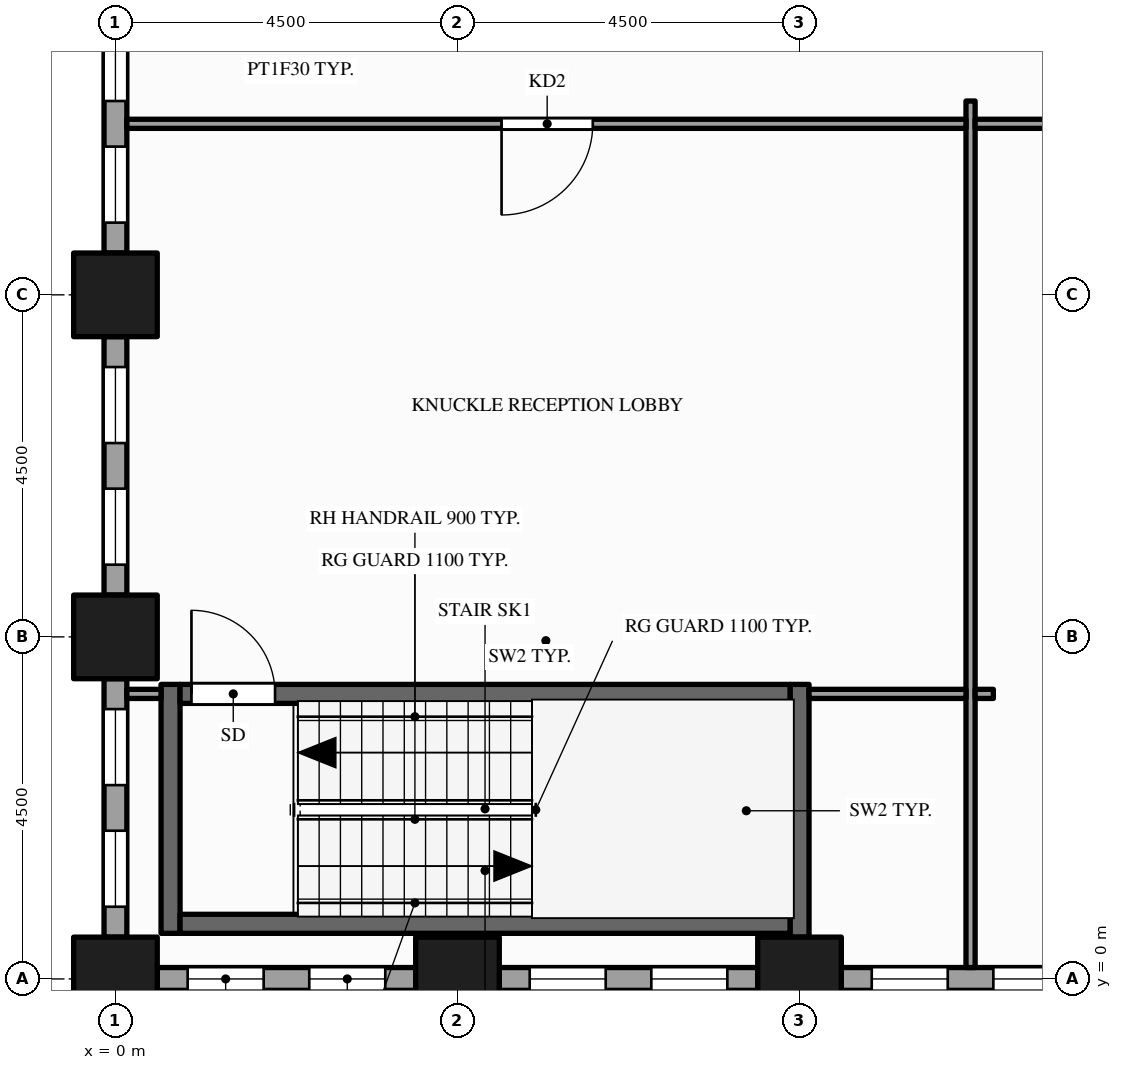
"""IFC4 building model, lengths in metres.
Left out: names, types, materials, properties, quantities, classifications, styles, units other than length and angle.
Written with IfcOpenShell. Run it as: python <this file> out.ifc"""

import sys

from ifc_helpers import new_model, si_unit, direction, frame, frame_2d, origin, origin_2d, place, context, subcontext, project, spatial, rectangle, hollow_rectangle, extrude, element, fill, save


model = new_model("IFC4")
c1 = context("Model", 3, precision=1e-05, world=origin(), true_north=direction((0.0, 1.0)))
c2 = subcontext(c1, "Body", "Model", "MODEL_VIEW")
j1 = project(units=[si_unit("LENGTHUNIT", "METRE"), si_unit("PLANEANGLEUNIT", "RADIAN")], contexts=[c1])
p1 = place(None, origin())
s1 = spatial("IfcSite", under=j1, at=p1, CompositionType="ELEMENT")
p2 = place(p1, origin())
s2 = spatial("IfcBuilding", under=s1, at=p2, CompositionType="ELEMENT")
p3 = place(p2, frame((0.0, 0.0, 45.0)))
s3 = spatial("IfcBuildingStorey", under=s2, at=p3, CompositionType="ELEMENT", Elevation=45.0)
for number, where, z_axis, x_axis in (
    (1, (0.0, 0.0, -0.15), (0.0, 0.0, 1.0), (1.0, 0.0, 0.0)),
    (2, (0.0, 4.5, -0.15), (0.0, 0.0, 1.0), (1.0, 0.0, 0.0)),
    (3, (0.0, 9.0, -0.15), (0.0, 0.0, 1.0), (1.0, 0.0, 0.0)),
    (4, (4.5, 0.0, -0.15), (0.0, 0.0, 1.0), (1.0, 0.0, 0.0)),
    (5, (9.0, 0.0, -0.15), (0.0, 0.0, 1.0), (1.0, 0.0, 0.0)),
):
    element("IfcColumn", number, at=place(p3, frame(where, z_axis=z_axis, x_axis=x_axis)), inside=s3, PredefinedType="COLUMN", context=c2, shape_type="SweptSolid", body=[
        extrude(hollow_rectangle(XDim=1.1, YDim=1.1, WallThickness=0.06, at=origin_2d()), origin(), (0.0, 0.0, 1.0), 4.0),
    ])
p4 = place(p3, frame((0.55, 0.0, 0.0), z_axis=(0.0, 0.0, 1.0), x_axis=(1.0, 0.0, 0.0)))
e6 = element("IfcWall", 6, at=p4, inside=s3, PredefinedType="STANDARD", context=c2, shape_type="SweptSolid", body=[
    extrude(rectangle(XDim=3.4, YDim=0.3, at=frame_2d((1.7, 0.0))), origin(), (0.0, 0.0, 1.0), 3.144),
])
p5 = place(p4, frame((0.4, 0.0, 0.9)))
e7 = element("IfcOpeningElement", 7, at=p5, cuts=e6, PredefinedType="OPENING", context=c2, shape_type="SweptSolid", body=[
    extrude(rectangle(XDim=1.0, YDim=2.0, at=frame_2d((0.5, 1.0))), frame((0.0, 0.16, 0.0), z_axis=(0.0, -1.0, 0.0), x_axis=(1.0, 0.0, 0.0)), (0.0, 0.0, 1.0), 0.32),
])
p6 = place(p4, frame((2.0, 0.0, 0.9)))
e8 = element("IfcOpeningElement", 8, at=p6, cuts=e6, PredefinedType="OPENING", context=c2, shape_type="SweptSolid", body=[
    extrude(rectangle(XDim=1.0, YDim=2.0, at=frame_2d((0.5, 1.0))), frame((0.0, 0.16, 0.0), z_axis=(0.0, -1.0, 0.0), x_axis=(1.0, 0.0, 0.0)), (0.0, 0.0, 1.0), 0.32),
])
p7 = place(p3, frame((5.05, 0.0, 0.0), z_axis=(0.0, 0.0, 1.0), x_axis=(1.0, 0.0, 0.0)))
e9 = element("IfcWall", 9, at=p7, inside=s3, PredefinedType="STANDARD", context=c2, shape_type="SweptSolid", body=[
    extrude(rectangle(XDim=3.4, YDim=0.3, at=frame_2d((1.7, 0.0))), origin(), (0.0, 0.0, 1.0), 3.144),
])
p8 = place(p7, frame((0.4, 0.0, 0.9)))
e10 = element("IfcOpeningElement", 10, at=p8, cuts=e9, PredefinedType="OPENING", context=c2, shape_type="SweptSolid", body=[
    extrude(rectangle(XDim=1.0, YDim=2.0, at=frame_2d((0.5, 1.0))), frame((0.0, 0.16, 0.0), z_axis=(0.0, -1.0, 0.0), x_axis=(1.0, 0.0, 0.0)), (0.0, 0.0, 1.0), 0.32),
])
p9 = place(p7, frame((2.0, 0.0, 0.9)))
e11 = element("IfcOpeningElement", 11, at=p9, cuts=e9, PredefinedType="OPENING", context=c2, shape_type="SweptSolid", body=[
    extrude(rectangle(XDim=1.0, YDim=2.0, at=frame_2d((0.5, 1.0))), frame((0.0, 0.16, 0.0), z_axis=(0.0, -1.0, 0.0), x_axis=(1.0, 0.0, 0.0)), (0.0, 0.0, 1.0), 0.32),
])
p10 = place(p3, frame((9.55, 0.0, 0.0), z_axis=(0.0, 0.0, 1.0), x_axis=(1.0, 0.0, 0.0)))
e12 = element("IfcWall", 12, at=p10, inside=s3, PredefinedType="STANDARD", context=c2, shape_type="SweptSolid", body=[
    extrude(rectangle(XDim=3.4, YDim=0.3, at=frame_2d((1.7, 0.0))), origin(), (0.0, 0.0, 1.0), 3.144),
])
p11 = place(p10, frame((0.4, 0.0, 0.9)))
e13 = element("IfcOpeningElement", 13, at=p11, cuts=e12, PredefinedType="OPENING", context=c2, shape_type="SweptSolid", body=[
    extrude(rectangle(XDim=1.0, YDim=2.0, at=frame_2d((0.5, 1.0))), frame((0.0, 0.16, 0.0), z_axis=(0.0, -1.0, 0.0), x_axis=(1.0, 0.0, 0.0)), (0.0, 0.0, 1.0), 0.32),
])
p12 = place(p10, frame((2.0, 0.0, 0.9)))
e14 = element("IfcOpeningElement", 14, at=p12, cuts=e12, PredefinedType="OPENING", context=c2, shape_type="SweptSolid", body=[
    extrude(rectangle(XDim=1.0, YDim=2.0, at=frame_2d((0.5, 1.0))), frame((0.0, 0.16, 0.0), z_axis=(0.0, -1.0, 0.0), x_axis=(1.0, 0.0, 0.0)), (0.0, 0.0, 1.0), 0.32),
])
p13 = place(p3, frame((0.0, 12.95, 0.0), z_axis=(0.0, 0.0, 1.0), x_axis=(0.0, -1.0, 0.0)))
e15 = element("IfcWall", 15, at=p13, inside=s3, PredefinedType="STANDARD", context=c2, shape_type="SweptSolid", body=[
    extrude(rectangle(XDim=3.4, YDim=0.3, at=frame_2d((1.7, 0.0))), origin(), (0.0, 0.0, 1.0), 3.144),
])
p14 = place(p13, frame((0.4, 0.0, 0.9)))
e16 = element("IfcOpeningElement", 16, at=p14, cuts=e15, PredefinedType="OPENING", context=c2, shape_type="SweptSolid", body=[
    extrude(rectangle(XDim=1.0, YDim=2.0, at=frame_2d((0.5, 1.0))), frame((0.0, 0.16, 0.0), z_axis=(0.0, -1.0, 0.0), x_axis=(1.0, 0.0, 0.0)), (0.0, 0.0, 1.0), 0.32),
])
p15 = place(p13, frame((2.0, 0.0, 0.9)))
e17 = element("IfcOpeningElement", 17, at=p15, cuts=e15, PredefinedType="OPENING", context=c2, shape_type="SweptSolid", body=[
    extrude(rectangle(XDim=1.0, YDim=2.0, at=frame_2d((0.5, 1.0))), frame((0.0, 0.16, 0.0), z_axis=(0.0, -1.0, 0.0), x_axis=(1.0, 0.0, 0.0)), (0.0, 0.0, 1.0), 0.32),
])
p16 = place(p3, frame((0.0, 8.45, 0.0), z_axis=(0.0, 0.0, 1.0), x_axis=(0.0, -1.0, 0.0)))
e18 = element("IfcWall", 18, at=p16, inside=s3, PredefinedType="STANDARD", context=c2, shape_type="SweptSolid", body=[
    extrude(rectangle(XDim=3.4, YDim=0.3, at=frame_2d((1.7, 0.0))), origin(), (0.0, 0.0, 1.0), 3.144),
])
p17 = place(p16, frame((0.4, 0.0, 0.9)))
e19 = element("IfcOpeningElement", 19, at=p17, cuts=e18, PredefinedType="OPENING", context=c2, shape_type="SweptSolid", body=[
    extrude(rectangle(XDim=1.0, YDim=2.0, at=frame_2d((0.5, 1.0))), frame((0.0, 0.16, 0.0), z_axis=(0.0, -1.0, 0.0), x_axis=(1.0, 0.0, 0.0)), (0.0, 0.0, 1.0), 0.32),
])
p18 = place(p16, frame((2.0, 0.0, 0.9)))
e20 = element("IfcOpeningElement", 20, at=p18, cuts=e18, PredefinedType="OPENING", context=c2, shape_type="SweptSolid", body=[
    extrude(rectangle(XDim=1.0, YDim=2.0, at=frame_2d((0.5, 1.0))), frame((0.0, 0.16, 0.0), z_axis=(0.0, -1.0, 0.0), x_axis=(1.0, 0.0, 0.0)), (0.0, 0.0, 1.0), 0.32),
])
p19 = place(p3, frame((0.0, 3.95, 0.0), z_axis=(0.0, 0.0, 1.0), x_axis=(0.0, -1.0, 0.0)))
e21 = element("IfcWall", 21, at=p19, inside=s3, PredefinedType="STANDARD", context=c2, shape_type="SweptSolid", body=[
    extrude(rectangle(XDim=3.4, YDim=0.3, at=frame_2d((1.7, 0.0))), origin(), (0.0, 0.0, 1.0), 3.144),
])
p20 = place(p19, frame((0.4, 0.0, 0.9)))
e22 = element("IfcOpeningElement", 22, at=p20, cuts=e21, PredefinedType="OPENING", context=c2, shape_type="SweptSolid", body=[
    extrude(rectangle(XDim=1.0, YDim=2.0, at=frame_2d((0.5, 1.0))), frame((0.0, 0.16, 0.0), z_axis=(0.0, -1.0, 0.0), x_axis=(1.0, 0.0, 0.0)), (0.0, 0.0, 1.0), 0.32),
])
p21 = place(p19, frame((2.0, 0.0, 0.9)))
e23 = element("IfcOpeningElement", 23, at=p21, cuts=e21, PredefinedType="OPENING", context=c2, shape_type="SweptSolid", body=[
    extrude(rectangle(XDim=1.0, YDim=2.0, at=frame_2d((0.5, 1.0))), frame((0.0, 0.16, 0.0), z_axis=(0.0, -1.0, 0.0), x_axis=(1.0, 0.0, 0.0)), (0.0, 0.0, 1.0), 0.32),
])
p22 = place(p3, frame((0.725, 0.6, 0.0), z_axis=(0.0, 0.0, 1.0), x_axis=(0.0, 1.0, 0.0)))
e24 = element("IfcWall", 24, at=p22, inside=s3, PredefinedType="SHEAR", context=c2, shape_type="SweptSolid", body=[
    extrude(rectangle(XDim=3.275, YDim=0.25, at=frame_2d((1.637, 0.0))), origin(), (0.0, 0.0, 1.0), 3.85),
])
p23 = place(p3, frame((9.0, 0.55, 0.0), z_axis=(0.0, 0.0, 1.0), x_axis=(0.0, 1.0, 0.0)))
e25 = element("IfcWall", 25, at=p23, inside=s3, PredefinedType="SHEAR", context=c2, shape_type="SweptSolid", body=[
    extrude(rectangle(XDim=3.325, YDim=0.25, at=frame_2d((1.663, 0.0))), origin(), (0.0, 0.0, 1.0), 3.85),
])
p24 = place(p3, frame((11.25, 0.15, 0.0), z_axis=(0.0, 0.0, 1.0), x_axis=(0.0, 1.0, 0.0)))
e26 = element("IfcWall", 26, at=p24, inside=s3, PredefinedType="PARTITIONING", context=c2, shape_type="SweptSolid", body=[
    extrude(rectangle(XDim=11.4, YDim=0.12, at=frame_2d((5.7, 0.0))), origin(), (0.0, 0.0, 1.0), 2.938),
])
p25 = place(p3, frame((0.85, 0.725, 0.0), z_axis=(0.0, 0.0, 1.0), x_axis=(1.0, 0.0, 0.0)))
e27 = element("IfcWall", 27, at=p25, inside=s3, PredefinedType="SHEAR", context=c2, shape_type="SweptSolid", body=[
    extrude(rectangle(XDim=8.025, YDim=0.25, at=frame_2d((4.012, 0.0))), origin(), (0.0, 0.0, 1.0), 3.85),
])
p26 = place(p3, frame((0.15, 3.75, 0.0), z_axis=(0.0, 0.0, 1.0), x_axis=(1.0, 0.0, 0.0)))
e28 = element("IfcWall", 28, at=p26, inside=s3, PredefinedType="PARTITIONING", context=c2, shape_type="SweptSolid", body=[
    extrude(rectangle(XDim=0.45, YDim=0.12, at=frame_2d((0.225, 0.0))), origin(), (0.0, 0.0, 1.0), 3.144),
])
p27 = place(p3, frame((0.85, 3.75, 0.0), z_axis=(0.0, 0.0, 1.0), x_axis=(1.0, 0.0, 0.0)))
e29 = element("IfcWall", 29, at=p27, inside=s3, PredefinedType="SHEAR", context=c2, shape_type="SweptSolid", body=[
    extrude(rectangle(XDim=8.025, YDim=0.25, at=frame_2d((4.012, 0.0))), origin(), (0.0, 0.0, 1.0), 3.85),
])
p28 = place(p27, frame((0.15, 0.0, 0.0)))
e30 = element("IfcOpeningElement", 30, at=p28, cuts=e29, PredefinedType="OPENING", context=c2, shape_type="SweptSolid", body=[
    extrude(rectangle(XDim=1.1, YDim=2.1, at=frame_2d((0.55, 1.05))), frame((0.0, 0.135, 0.0), z_axis=(0.0, -1.0, 0.0), x_axis=(1.0, 0.0, 0.0)), (0.0, 0.0, 1.0), 0.27),
])
p29 = place(p3, frame((9.125, 3.75, 0.0), z_axis=(0.0, 0.0, 1.0), x_axis=(1.0, 0.0, 0.0)))
e31 = element("IfcWall", 31, at=p29, inside=s3, PredefinedType="PARTITIONING", context=c2, shape_type="SweptSolid", body=[
    extrude(rectangle(XDim=2.065, YDim=0.12, at=frame_2d((1.032, 0.0))), origin(), (0.0, 0.0, 1.0), 2.938),
])
p30 = place(p3, frame((11.31, 3.75, 0.0), z_axis=(0.0, 0.0, 1.0), x_axis=(1.0, 0.0, 0.0)))
e32 = element("IfcWall", 32, at=p30, inside=s3, PredefinedType="PARTITIONING", context=c2, shape_type="SweptSolid", body=[
    extrude(rectangle(XDim=0.24, YDim=0.12, at=frame_2d((0.12, 0.0))), origin(), (0.0, 0.0, 1.0), 2.938),
])
p31 = place(p3, frame((0.15, 11.25, 0.0), z_axis=(0.0, 0.0, 1.0), x_axis=(1.0, 0.0, 0.0)))
e33 = element("IfcWall", 33, at=p31, inside=s3, PredefinedType="PARTITIONING", context=c2, shape_type="SweptSolid", body=[
    extrude(rectangle(XDim=11.04, YDim=0.12, at=frame_2d((5.52, 0.0))), origin(), (0.0, 0.0, 1.0), 2.938),
])
p32 = place(p31, frame((4.93, 0.0, 0.0)))
e34 = element("IfcOpeningElement", 34, at=p32, cuts=e33, PredefinedType="OPENING", context=c2, shape_type="SweptSolid", body=[
    extrude(rectangle(XDim=1.2, YDim=2.1, at=frame_2d((0.6, 1.05))), frame((0.0, 0.07, 0.0), z_axis=(0.0, -1.0, 0.0), x_axis=(1.0, 0.0, 0.0)), (0.0, 0.0, 1.0), 0.14),
])
p33 = place(p3, frame((11.31, 11.25, 0.0), z_axis=(0.0, 0.0, 1.0), x_axis=(1.0, 0.0, 0.0)))
e35 = element("IfcWall", 35, at=p33, inside=s3, PredefinedType="PARTITIONING", context=c2, shape_type="SweptSolid", body=[
    extrude(rectangle(XDim=4.38, YDim=0.12, at=frame_2d((2.19, 0.0))), origin(), (0.0, 0.0, 1.0), 2.938),
])
p34 = place(p33, frame((1.69, 0.0, 0.0)))
e36 = element("IfcOpeningElement", 36, at=p34, cuts=e35, PredefinedType="OPENING", context=c2, shape_type="SweptSolid", body=[
    extrude(rectangle(XDim=1.0, YDim=2.1, at=frame_2d((0.5, 1.05))), frame((0.0, 0.07, 0.0), z_axis=(0.0, -1.0, 0.0), x_axis=(1.0, 0.0, 0.0)), (0.0, 0.0, 1.0), 0.14),
])
p35 = place(p5, origin())
e37 = element("IfcWindow", 37, at=p35, inside=s3, PartitioningType="SINGLE_PANEL", PredefinedType="WINDOW", context=c2, shape_type="SweptSolid", body=[
    extrude(rectangle(XDim=1.0, YDim=2.0, at=frame_2d((0.5, 1.0))), frame((0.0, 0.03, 0.0), z_axis=(0.0, -1.0, 0.0), x_axis=(1.0, 0.0, 0.0)), (0.0, 0.0, 1.0), 0.06),
])
fill(e7, e37)
p36 = place(p6, origin())
e38 = element("IfcWindow", 38, at=p36, inside=s3, PartitioningType="SINGLE_PANEL", PredefinedType="WINDOW", context=c2, shape_type="SweptSolid", body=[
    extrude(rectangle(XDim=1.0, YDim=2.0, at=frame_2d((0.5, 1.0))), frame((0.0, 0.03, 0.0), z_axis=(0.0, -1.0, 0.0), x_axis=(1.0, 0.0, 0.0)), (0.0, 0.0, 1.0), 0.06),
])
fill(e8, e38)
p37 = place(p8, origin())
e39 = element("IfcWindow", 39, at=p37, inside=s3, PartitioningType="SINGLE_PANEL", PredefinedType="WINDOW", context=c2, shape_type="SweptSolid", body=[
    extrude(rectangle(XDim=1.0, YDim=2.0, at=frame_2d((0.5, 1.0))), frame((0.0, 0.03, 0.0), z_axis=(0.0, -1.0, 0.0), x_axis=(1.0, 0.0, 0.0)), (0.0, 0.0, 1.0), 0.06),
])
fill(e10, e39)
p38 = place(p9, origin())
e40 = element("IfcWindow", 40, at=p38, inside=s3, PartitioningType="SINGLE_PANEL", PredefinedType="WINDOW", context=c2, shape_type="SweptSolid", body=[
    extrude(rectangle(XDim=1.0, YDim=2.0, at=frame_2d((0.5, 1.0))), frame((0.0, 0.03, 0.0), z_axis=(0.0, -1.0, 0.0), x_axis=(1.0, 0.0, 0.0)), (0.0, 0.0, 1.0), 0.06),
])
fill(e11, e40)
p39 = place(p11, origin())
e41 = element("IfcWindow", 41, at=p39, inside=s3, PartitioningType="SINGLE_PANEL", PredefinedType="WINDOW", context=c2, shape_type="SweptSolid", body=[
    extrude(rectangle(XDim=1.0, YDim=2.0, at=frame_2d((0.5, 1.0))), frame((0.0, 0.03, 0.0), z_axis=(0.0, -1.0, 0.0), x_axis=(1.0, 0.0, 0.0)), (0.0, 0.0, 1.0), 0.06),
])
fill(e13, e41)
p40 = place(p12, origin())
e42 = element("IfcWindow", 42, at=p40, inside=s3, PartitioningType="SINGLE_PANEL", PredefinedType="WINDOW", context=c2, shape_type="SweptSolid", body=[
    extrude(rectangle(XDim=1.0, YDim=2.0, at=frame_2d((0.5, 1.0))), frame((0.0, 0.03, 0.0), z_axis=(0.0, -1.0, 0.0), x_axis=(1.0, 0.0, 0.0)), (0.0, 0.0, 1.0), 0.06),
])
fill(e14, e42)
p41 = place(p14, origin())
e43 = element("IfcWindow", 43, at=p41, inside=s3, PartitioningType="SINGLE_PANEL", PredefinedType="WINDOW", context=c2, shape_type="SweptSolid", body=[
    extrude(rectangle(XDim=1.0, YDim=2.0, at=frame_2d((0.5, 1.0))), frame((0.0, 0.03, 0.0), z_axis=(0.0, -1.0, 0.0), x_axis=(1.0, 0.0, 0.0)), (0.0, 0.0, 1.0), 0.06),
])
fill(e16, e43)
p42 = place(p15, origin())
e44 = element("IfcWindow", 44, at=p42, inside=s3, PartitioningType="SINGLE_PANEL", PredefinedType="WINDOW", context=c2, shape_type="SweptSolid", body=[
    extrude(rectangle(XDim=1.0, YDim=2.0, at=frame_2d((0.5, 1.0))), frame((0.0, 0.03, 0.0), z_axis=(0.0, -1.0, 0.0), x_axis=(1.0, 0.0, 0.0)), (0.0, 0.0, 1.0), 0.06),
])
fill(e17, e44)
p43 = place(p17, origin())
e45 = element("IfcWindow", 45, at=p43, inside=s3, PartitioningType="SINGLE_PANEL", PredefinedType="WINDOW", context=c2, shape_type="SweptSolid", body=[
    extrude(rectangle(XDim=1.0, YDim=2.0, at=frame_2d((0.5, 1.0))), frame((0.0, 0.03, 0.0), z_axis=(0.0, -1.0, 0.0), x_axis=(1.0, 0.0, 0.0)), (0.0, 0.0, 1.0), 0.06),
])
fill(e19, e45)
p44 = place(p18, origin())
e46 = element("IfcWindow", 46, at=p44, inside=s3, PartitioningType="SINGLE_PANEL", PredefinedType="WINDOW", context=c2, shape_type="SweptSolid", body=[
    extrude(rectangle(XDim=1.0, YDim=2.0, at=frame_2d((0.5, 1.0))), frame((0.0, 0.03, 0.0), z_axis=(0.0, -1.0, 0.0), x_axis=(1.0, 0.0, 0.0)), (0.0, 0.0, 1.0), 0.06),
])
fill(e20, e46)
p45 = place(p20, origin())
e47 = element("IfcWindow", 47, at=p45, inside=s3, PartitioningType="SINGLE_PANEL", PredefinedType="WINDOW", context=c2, shape_type="SweptSolid", body=[
    extrude(rectangle(XDim=1.0, YDim=2.0, at=frame_2d((0.5, 1.0))), frame((0.0, 0.03, 0.0), z_axis=(0.0, -1.0, 0.0), x_axis=(1.0, 0.0, 0.0)), (0.0, 0.0, 1.0), 0.06),
])
fill(e22, e47)
p46 = place(p21, origin())
e48 = element("IfcWindow", 48, at=p46, inside=s3, PartitioningType="SINGLE_PANEL", PredefinedType="WINDOW", context=c2, shape_type="SweptSolid", body=[
    extrude(rectangle(XDim=1.0, YDim=2.0, at=frame_2d((0.5, 1.0))), frame((0.0, 0.03, 0.0), z_axis=(0.0, -1.0, 0.0), x_axis=(1.0, 0.0, 0.0)), (0.0, 0.0, 1.0), 0.06),
])
fill(e23, e48)
p47 = place(p28, origin())
e49 = element("IfcDoor", 49, at=p47, inside=s3, OperationType="SINGLE_SWING_LEFT", PredefinedType="DOOR", context=c2, shape_type="SweptSolid", body=[
    extrude(rectangle(XDim=1.1, YDim=2.1, at=frame_2d((0.55, 1.05))), frame((0.0, 0.025, 0.0), z_axis=(0.0, -1.0, 0.0), x_axis=(1.0, 0.0, 0.0)), (0.0, 0.0, 1.0), 0.05),
])
fill(e30, e49)
p48 = place(p32, origin())
e50 = element("IfcDoor", 50, at=p48, inside=s3, OperationType="SINGLE_SWING_LEFT", PredefinedType="DOOR", context=c2, shape_type="SweptSolid", body=[
    extrude(rectangle(XDim=1.2, YDim=2.1, at=frame_2d((0.6, 1.05))), frame((0.0, 0.025, 0.0), z_axis=(0.0, -1.0, 0.0), x_axis=(1.0, 0.0, 0.0)), (0.0, 0.0, 1.0), 0.05),
])
fill(e34, e50)
save(model, sys.argv[1])
